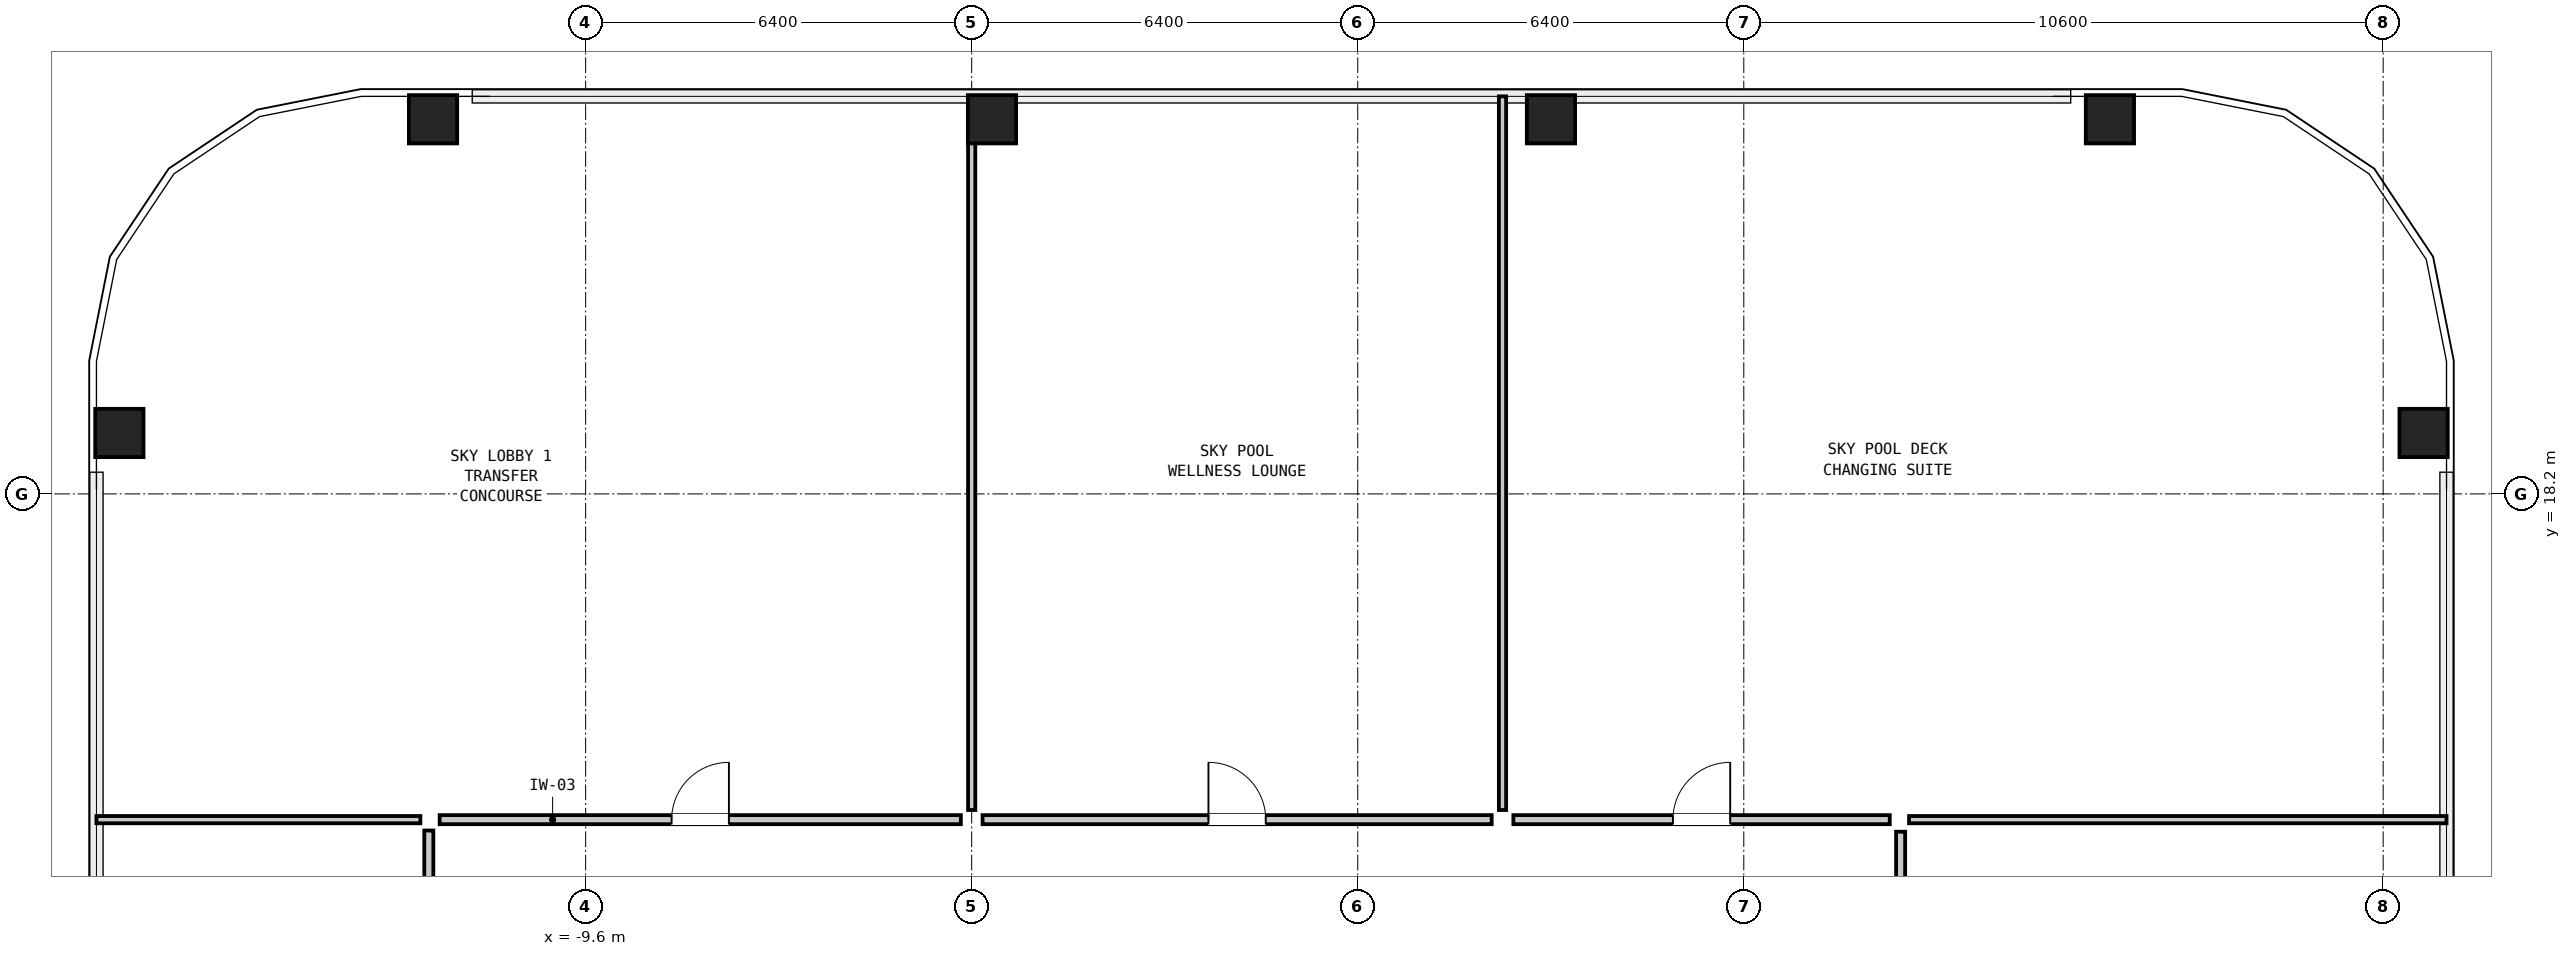
"""IFC4 building model, lengths in metres.
Left out: names, types, materials, properties, quantities, classifications, styles, units other than length and angle.
Written with IfcOpenShell. Run it as: python <this file> out.ifc"""

import sys

from ifc_helpers import new_model, si_unit, direction, frame, frame_2d, origin, origin_2d, place, context, subcontext, project, spatial, rectangle, hollow_rectangle, extrude, element, fill, save


model = new_model("IFC4")
c1 = context("Model", 3, precision=1e-05, world=origin(), true_north=direction((0.0, 1.0)))
c2 = subcontext(c1, "Body", "Model", "MODEL_VIEW")
j1 = project(units=[si_unit("LENGTHUNIT", "METRE"), si_unit("PLANEANGLEUNIT", "RADIAN")], contexts=[c1])
p1 = place(None, origin())
s1 = spatial("IfcSite", under=j1, at=p1, CompositionType="ELEMENT")
p2 = place(p1, origin())
s2 = spatial("IfcBuilding", under=s1, at=p2, CompositionType="ELEMENT")
p3 = place(p2, frame((0.0, 0.0, 104.85)))
s3 = spatial("IfcBuildingStorey", under=s2, at=p3, CompositionType="ELEMENT", Elevation=104.85)
for number, where, z_axis, x_axis in (
    (1, (20.87, 19.21, 0.0), (0.0, 0.0, 1.0), (0.0, 1.0, 0.0)),
    (2, (15.67, 24.41, 0.0), (0.0, 0.0, 1.0), (1.0, 0.0, 0.0)),
    (3, (6.403, 24.41, 0.0), (0.0, 0.0, 1.0), (1.0, 0.0, 0.0)),
    (4, (-2.863, 24.41, 0.0), (0.0, 0.0, 1.0), (1.0, 0.0, 0.0)),
    (5, (-12.13, 24.41, 0.0), (0.0, 0.0, 1.0), (1.0, 0.0, 0.0)),
    (6, (-17.33, 19.21, 0.0), (0.0, 0.0, 1.0), (0.0, 1.0, 0.0)),
):
    element("IfcColumn", number, at=place(p3, frame(where, z_axis=z_axis, x_axis=x_axis)), inside=s3, PredefinedType="COLUMN", context=c2, shape_type="SweptSolid", body=[
        extrude(hollow_rectangle(XDim=0.8, YDim=0.8, WallThickness=0.05, at=origin_2d()), origin(), (0.0, 0.0, 1.0), 3.6),
    ])
p4 = place(p3, frame((-17.71, 12.8, 0.0), z_axis=(0.0, 0.0, 1.0), x_axis=(1.0, 0.0, 0.0)))
e7 = element("IfcWall", 7, at=p4, inside=s3, PredefinedType="PARTITIONING", context=c2, shape_type="SweptSolid", body=[
    extrude(rectangle(XDim=5.37, YDim=0.12, at=frame_2d((2.685, 0.0))), origin(), (0.0, 0.0, 1.0), 3.22),
])
p5 = place(p3, frame((12.34, 12.8, 0.0), z_axis=(0.0, 0.0, 1.0), x_axis=(1.0, 0.0, 0.0)))
e8 = element("IfcWall", 8, at=p5, inside=s3, PredefinedType="PARTITIONING", context=c2, shape_type="SweptSolid", body=[
    extrude(rectangle(XDim=8.91, YDim=0.12, at=frame_2d((4.455, 0.0))), origin(), (0.0, 0.0, 1.0), 3.22),
])
p6 = place(p3, frame((-3.2, 12.96, 0.0), z_axis=(0.0, 0.0, 1.0), x_axis=(0.0, 1.0, 0.0)))
e9 = element("IfcWall", 9, at=p6, inside=s3, PredefinedType="PARTITIONING", context=c2, shape_type="SweptSolid", body=[
    extrude(rectangle(XDim=11.83, YDim=0.12, at=frame_2d((5.915, 0.0))), origin(), (0.0, 0.0, 1.0), 2.438),
])
p7 = place(p3, frame((5.6, 12.96, 0.0), z_axis=(0.0, 0.0, 1.0), x_axis=(0.0, 1.0, 0.0)))
e10 = element("IfcWall", 10, at=p7, inside=s3, PredefinedType="PARTITIONING", context=c2, shape_type="SweptSolid", body=[
    extrude(rectangle(XDim=11.83, YDim=0.12, at=frame_2d((5.915, 0.0))), origin(), (0.0, 0.0, 1.0), 3.22),
])
p8 = place(p3, frame((-12.02, 12.8, 0.0), z_axis=(0.0, 0.0, 1.0), x_axis=(1.0, 0.0, 0.0)))
e11 = element("IfcWall", 11, at=p8, inside=s3, PredefinedType="PARTITIONING", context=c2, shape_type="SweptSolid", body=[
    extrude(rectangle(XDim=8.64, YDim=0.15, at=frame_2d((4.32, 0.0))), origin(), (0.0, 0.0, 1.0), 3.22),
])
p9 = place(p8, frame((3.845, 0.0, 0.0)))
e12 = element("IfcOpeningElement", 12, at=p9, cuts=e11, PredefinedType="OPENING", context=c2, shape_type="SweptSolid", body=[
    extrude(rectangle(XDim=0.95, YDim=2.1, at=frame_2d((0.475, 1.05))), frame((0.0, 0.087, 0.0), z_axis=(0.0, -1.0, 0.0), x_axis=(1.0, 0.0, 0.0)), (0.0, 0.0, 1.0), 0.174),
])
p10 = place(p3, frame((-3.02, 12.8, 0.0), z_axis=(0.0, 0.0, 1.0), x_axis=(1.0, 0.0, 0.0)))
e13 = element("IfcWall", 13, at=p10, inside=s3, PredefinedType="PARTITIONING", context=c2, shape_type="SweptSolid", body=[
    extrude(rectangle(XDim=8.44, YDim=0.15, at=frame_2d((4.22, 0.0))), origin(), (0.0, 0.0, 1.0), 3.22),
])
p11 = place(p10, frame((3.745, 0.0, 0.0)))
e14 = element("IfcOpeningElement", 14, at=p11, cuts=e13, PredefinedType="OPENING", context=c2, shape_type="SweptSolid", body=[
    extrude(rectangle(XDim=0.95, YDim=2.1, at=frame_2d((0.475, 1.05))), frame((0.0, 0.087, 0.0), z_axis=(0.0, -1.0, 0.0), x_axis=(1.0, 0.0, 0.0)), (0.0, 0.0, 1.0), 0.174),
])
p12 = place(p3, frame((5.78, 12.8, 0.0), z_axis=(0.0, 0.0, 1.0), x_axis=(1.0, 0.0, 0.0)))
e15 = element("IfcWall", 15, at=p12, inside=s3, PredefinedType="PARTITIONING", context=c2, shape_type="SweptSolid", body=[
    extrude(rectangle(XDim=6.24, YDim=0.15, at=frame_2d((3.12, 0.0))), origin(), (0.0, 0.0, 1.0), 3.22),
])
p13 = place(p12, frame((2.645, 0.0, 0.0)))
e16 = element("IfcOpeningElement", 16, at=p13, cuts=e15, PredefinedType="OPENING", context=c2, shape_type="SweptSolid", body=[
    extrude(rectangle(XDim=0.95, YDim=2.1, at=frame_2d((0.475, 1.05))), frame((0.0, 0.087, 0.0), z_axis=(0.0, -1.0, 0.0), x_axis=(1.0, 0.0, 0.0)), (0.0, 0.0, 1.0), 0.174),
])
p14 = place(p3, frame((-12.2, -11.42, 0.0), z_axis=(0.0, 0.0, 1.0), x_axis=(0.0, 1.0, 0.0)))
e17 = element("IfcWall", 17, at=p14, inside=s3, PredefinedType="PARTITIONING", context=c2, shape_type="SweptSolid", body=[
    extrude(rectangle(XDim=24.04, YDim=0.15, at=frame_2d((12.02, 0.0))), origin(), (0.0, 0.0, 1.0), 3.22),
])
p15 = place(p14, frame((11.545, 0.0, 0.0)))
e18 = element("IfcOpeningElement", 18, at=p15, cuts=e17, PredefinedType="OPENING", context=c2, shape_type="SweptSolid", body=[
    extrude(rectangle(XDim=0.95, YDim=2.1, at=frame_2d((0.475, 1.05))), frame((0.0, 0.087, 0.0), z_axis=(0.0, -1.0, 0.0), x_axis=(1.0, 0.0, 0.0)), (0.0, 0.0, 1.0), 0.174),
])
p16 = place(p3, frame((12.2, 3.8, 0.0), z_axis=(0.0, 0.0, 1.0), x_axis=(0.0, 1.0, 0.0)))
e19 = element("IfcWall", 19, at=p16, inside=s3, PredefinedType="PARTITIONING", context=c2, shape_type="SweptSolid", body=[
    extrude(rectangle(XDim=8.8, YDim=0.15, at=frame_2d((4.4, 0.0))), origin(), (0.0, 0.0, 1.0), 3.22),
])
p17 = place(p16, frame((3.925, 0.0, 0.0)))
e20 = element("IfcOpeningElement", 20, at=p17, cuts=e19, PredefinedType="OPENING", context=c2, shape_type="SweptSolid", body=[
    extrude(rectangle(XDim=0.95, YDim=2.1, at=frame_2d((0.475, 1.05))), frame((0.0, 0.087, 0.0), z_axis=(0.0, -1.0, 0.0), x_axis=(1.0, 0.0, 0.0)), (0.0, 0.0, 1.0), 0.174),
])
p18 = place(p9, origin())
e21 = element("IfcDoor", 21, at=p18, inside=s3, OperationType="SINGLE_SWING_RIGHT", PredefinedType="DOOR", context=c2, shape_type="SweptSolid", body=[
    extrude(rectangle(XDim=0.95, YDim=2.1, at=frame_2d((0.475, 1.05))), frame((0.0, 0.025, 0.0), z_axis=(0.0, -1.0, 0.0), x_axis=(1.0, 0.0, 0.0)), (0.0, 0.0, 1.0), 0.05),
])
fill(e12, e21)
p19 = place(p11, origin())
e22 = element("IfcDoor", 22, at=p19, inside=s3, OperationType="SINGLE_SWING_LEFT", PredefinedType="DOOR", context=c2, shape_type="SweptSolid", body=[
    extrude(rectangle(XDim=0.95, YDim=2.1, at=frame_2d((0.475, 1.05))), frame((0.0, 0.025, 0.0), z_axis=(0.0, -1.0, 0.0), x_axis=(1.0, 0.0, 0.0)), (0.0, 0.0, 1.0), 0.05),
])
fill(e14, e22)
p20 = place(p13, origin())
e23 = element("IfcDoor", 23, at=p20, inside=s3, OperationType="SINGLE_SWING_RIGHT", PredefinedType="DOOR", context=c2, shape_type="SweptSolid", body=[
    extrude(rectangle(XDim=0.95, YDim=2.1, at=frame_2d((0.475, 1.05))), frame((0.0, 0.025, 0.0), z_axis=(0.0, -1.0, 0.0), x_axis=(1.0, 0.0, 0.0)), (0.0, 0.0, 1.0), 0.05),
])
fill(e16, e23)
save(model, sys.argv[1])
